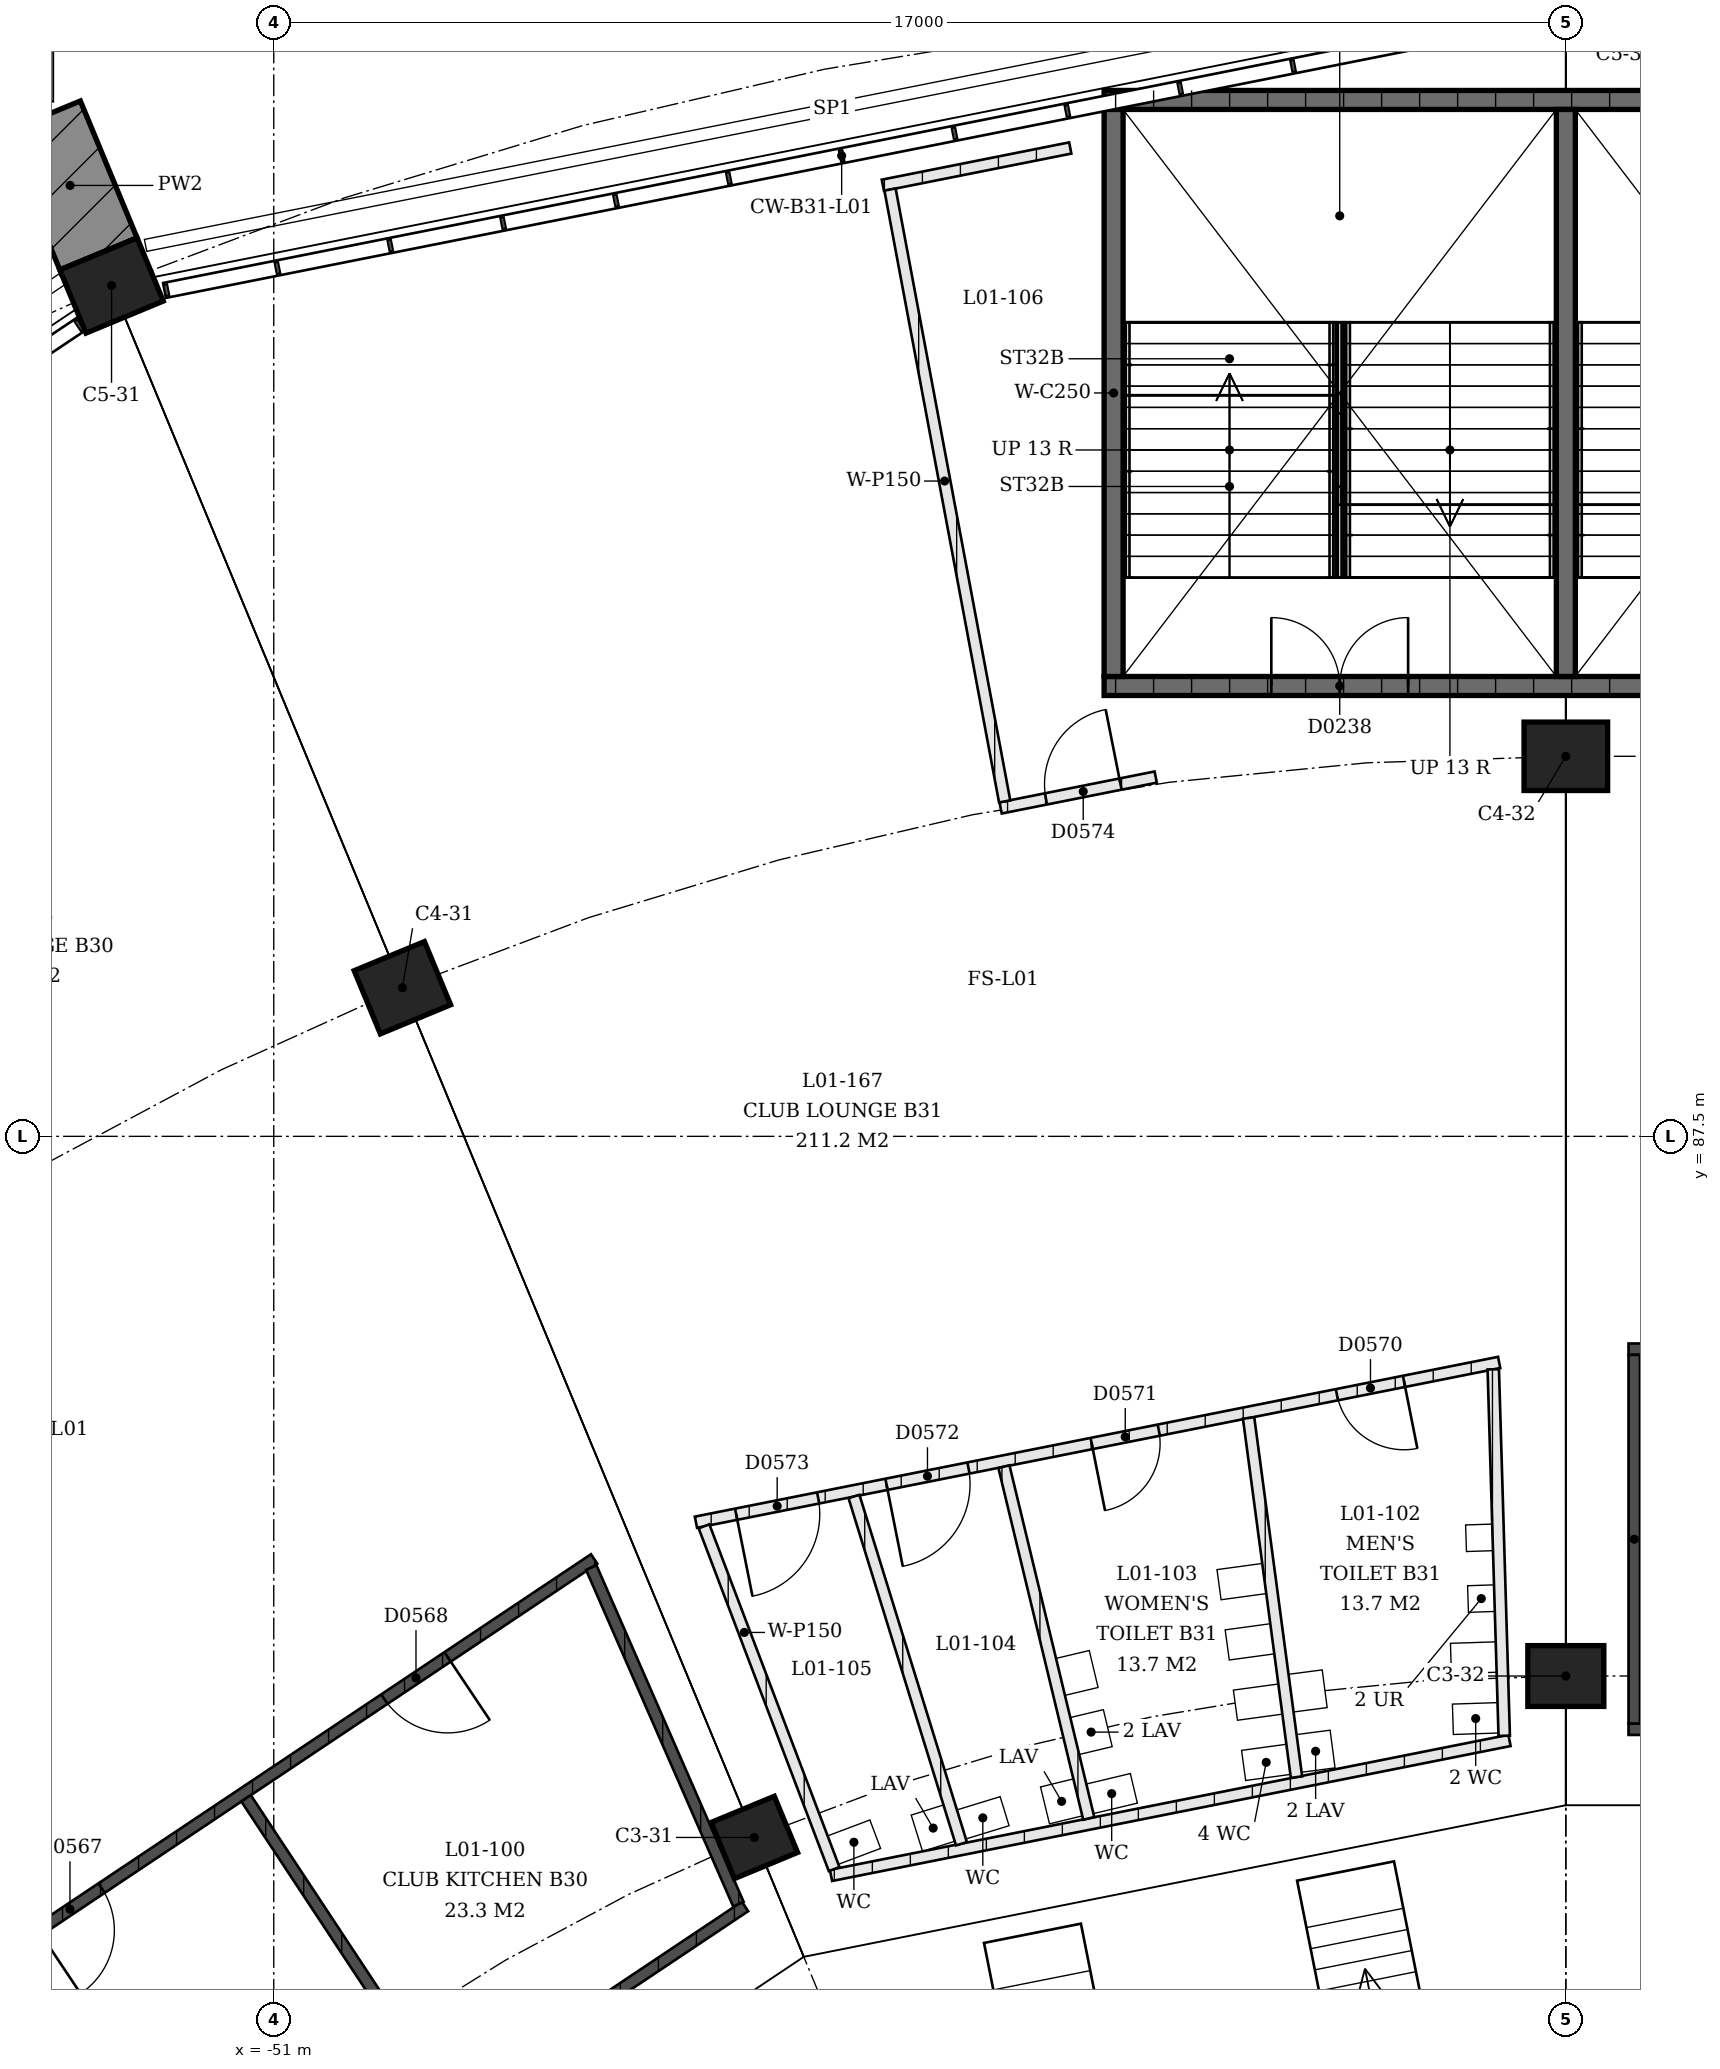
"""IFC4 building model, lengths in metres.
Left out: names, types, materials, properties, quantities, classifications, styles, units other than length and angle.
Written with IfcOpenShell. Run it as: python <this file> out.ifc"""

import sys

from ifc_helpers import new_model, si_unit, direction, frame, frame_2d, origin, origin_2d, place, context, subcontext, project, spatial, rectangle, extrude, element, fill, save


model = new_model("IFC4")
c1 = context("Model", 3, precision=1e-05, world=origin(), true_north=direction((0.0, 1.0)))
c2 = subcontext(c1, "Body", "Model", "MODEL_VIEW")
j1 = project(units=[si_unit("LENGTHUNIT", "METRE"), si_unit("PLANEANGLEUNIT", "RADIAN")], contexts=[c1])
p1 = place(None, origin())
s1 = spatial("IfcSite", under=j1, at=p1, CompositionType="ELEMENT")
p2 = place(p1, origin())
s2 = spatial("IfcBuilding", under=s1, at=p2, CompositionType="ELEMENT")
p3 = place(p2, frame((0.0, 0.0, 4.5)))
s3 = spatial("IfcBuildingStorey", under=s2, at=p3, CompositionType="ELEMENT", Elevation=4.5)
p4 = place(p3, frame((-44.677, 78.276, 0.0), z_axis=(0.0, 0.0, 1.0), x_axis=(-0.923879532511, -0.382683432365, 0.0)))
e1 = element("IfcColumn", 1, at=p4, inside=s3, PredefinedType="COLUMN", context=c2, shape_type="SweptSolid", body=[
    extrude(rectangle(XDim=0.9, YDim=0.8, at=origin_2d()), origin(), (0.0, 0.0, 1.0), 4.5),
])
p5 = place(p3, frame((-49.307, 89.455, 0.0), z_axis=(0.0, 0.0, 1.0), x_axis=(-0.923879532511, -0.382683432365, 0.0)))
e2 = element("IfcColumn", 2, at=p5, inside=s3, PredefinedType="COLUMN", context=c2, shape_type="SweptSolid", body=[
    extrude(rectangle(XDim=1.0, YDim=0.9, at=origin_2d()), origin(), (0.0, 0.0, 1.0), 4.5),
])
p6 = place(p3, frame((-53.134, 98.694, 0.0), z_axis=(0.0, 0.0, 1.0), x_axis=(-0.923879532511, -0.382683432365, 0.0)))
e3 = element("IfcColumn", 3, at=p6, inside=s3, PredefinedType="COLUMN", context=c2, shape_type="SweptSolid", body=[
    extrude(rectangle(XDim=1.1, YDim=0.9, at=origin_2d()), origin(), (0.0, 0.0, 1.0), 4.5),
])
p7 = place(p3, frame((-34.0, 80.4, 0.0), z_axis=(0.0, 0.0, 1.0), x_axis=(-1.0, 0.0, 0.0)))
e4 = element("IfcColumn", 4, at=p7, inside=s3, PredefinedType="COLUMN", context=c2, shape_type="SweptSolid", body=[
    extrude(rectangle(XDim=1.0, YDim=0.8, at=origin_2d()), origin(), (0.0, 0.0, 1.0), 4.5),
])
p8 = place(p3, frame((-34.0, 92.5, 0.0), z_axis=(0.0, 0.0, 1.0), x_axis=(-1.0, 0.0, 0.0)))
e5 = element("IfcColumn", 5, at=p8, inside=s3, PredefinedType="COLUMN", context=c2, shape_type="SweptSolid", body=[
    extrude(rectangle(XDim=1.1, YDim=0.9, at=origin_2d()), origin(), (0.0, 0.0, 1.0), 4.5),
])
p9 = place(p3, frame((-27.925, 93.425, 0.0), z_axis=(0.0, 0.0, 1.0), x_axis=(-1.0, 0.0, 0.0)))
e6 = element("IfcWall", 6, at=p9, inside=s3, PredefinedType="SHEAR", context=c2, shape_type="SweptSolid", body=[
    extrude(rectangle(XDim=12.15, YDim=0.25, at=frame_2d((6.075, 0.0))), origin(), (0.0, 0.0, 1.0), 4.09),
])
p10 = place(p9, frame((2.2, 0.0, 0.0)))
e7 = element("IfcOpeningElement", 7, at=p10, cuts=e6, PredefinedType="OPENING", context=c2, shape_type="SweptSolid", body=[
    extrude(rectangle(XDim=1.8, YDim=2.1, at=frame_2d((0.9, 1.05))), frame((0.0, 0.125, 0.0), z_axis=(0.0, -1.0, 0.0), x_axis=(1.0, 0.0, 0.0)), (0.0, 0.0, 1.0), 0.25),
])
p11 = place(p9, frame((8.15, 0.0, 0.0)))
e8 = element("IfcOpeningElement", 8, at=p11, cuts=e6, PredefinedType="OPENING", context=c2, shape_type="SweptSolid", body=[
    extrude(rectangle(XDim=1.8, YDim=2.1, at=frame_2d((0.9, 1.05))), frame((0.0, 0.125, 0.0), z_axis=(0.0, -1.0, 0.0), x_axis=(1.0, 0.0, 0.0)), (0.0, 0.0, 1.0), 0.25),
])
p12 = place(p3, frame((-27.925, 101.135, 0.0), z_axis=(0.0, 0.0, 1.0), x_axis=(-1.0, 0.0, 0.0)))
e9 = element("IfcWall", 9, at=p12, inside=s3, PredefinedType="SHEAR", context=c2, shape_type="SweptSolid", body=[
    extrude(rectangle(XDim=12.15, YDim=0.25, at=frame_2d((6.075, 0.0))), origin(), (0.0, 0.0, 1.0), 4.09),
])
for number, where, z_axis, x_axis in (
    (10, (-39.95, 93.55, 0.0), (0.0, 0.0, 1.0), (0.0, 1.0, 0.0)),
    (11, (-34.0, 93.55, 0.0), (0.0, 0.0, 1.0), (0.0, 1.0, 0.0)),
):
    element("IfcWall", number, at=place(p3, frame(where, z_axis=z_axis, x_axis=x_axis)), inside=s3, PredefinedType="SHEAR", context=c2, shape_type="SweptSolid", body=[
        extrude(rectangle(XDim=7.46, YDim=0.25, at=frame_2d((3.73, 0.0))), origin(), (0.0, 0.0, 1.0), 4.09),
    ])
p13 = place(p3, frame((-52.605, 72.153, 0.0), z_axis=(0.0, 0.0, 1.0), x_axis=(0.831461674059, 0.555582113257, 0.0)))
e12 = element("IfcWall", 12, at=p13, inside=s3, PredefinedType="SOLIDWALL", context=c2, shape_type="SweptSolid", body=[
    extrude(rectangle(XDim=9.388, YDim=0.15, at=frame_2d((4.694, 0.0))), origin(), (0.0, 0.0, 1.0), 3.0),
])
p14 = place(p3, frame((-56.025, 75.766, 0.0), z_axis=(0.0, 0.0, 1.0), x_axis=(0.831478677095, 0.55555666636, 0.0)))
e13 = element("IfcWall", 13, at=p14, inside=s3, PredefinedType="SOLIDWALL", context=c2, shape_type="SweptSolid", body=[
    extrude(rectangle(XDim=11.113, YDim=0.15, at=frame_2d((5.557, 0.0))), origin(), (0.0, 0.0, 1.0), 3.0),
])
p15 = place(p14, frame((2.319, 0.0, 0.0)))
e14 = element("IfcOpeningElement", 14, at=p15, cuts=e13, PredefinedType="OPENING", context=c2, shape_type="SweptSolid", body=[
    extrude(rectangle(XDim=1.0, YDim=2.1, at=frame_2d((0.5, 1.05))), frame((0.0, 0.075, 0.0), z_axis=(0.0, -1.0, 0.0), x_axis=(1.0, 0.0, 0.0)), (0.0, 0.0, 1.0), 0.15),
])
p16 = place(p14, frame((7.794, 0.0, 0.0)))
e15 = element("IfcOpeningElement", 15, at=p16, cuts=e13, PredefinedType="OPENING", context=c2, shape_type="SweptSolid", body=[
    extrude(rectangle(XDim=1.0, YDim=2.1, at=frame_2d((0.5, 1.05))), frame((0.0, 0.075, 0.0), z_axis=(0.0, -1.0, 0.0), x_axis=(1.0, 0.0, 0.0)), (0.0, 0.0, 1.0), 0.15),
])
p17 = place(p3, frame((-48.743, 74.822, 0.0), z_axis=(0.0, 0.0, 1.0), x_axis=(-0.551118175735, 0.834427202561, 0.0)))
e16 = element("IfcWall", 16, at=p17, inside=s3, PredefinedType="SOLIDWALL", context=c2, shape_type="SweptSolid", body=[
    extrude(rectangle(XDim=4.757, YDim=0.15, at=frame_2d((2.378, 0.0))), origin(), (0.0, 0.0, 1.0), 3.0),
])
p18 = place(p3, frame((-44.886, 77.399, 0.0), z_axis=(0.0, 0.0, 1.0), x_axis=(-0.400646552146, 0.916232688924, 0.0)))
e17 = element("IfcWall", 17, at=p18, inside=s3, PredefinedType="SOLIDWALL", context=c2, shape_type="SweptSolid", body=[
    extrude(rectangle(XDim=4.832, YDim=0.15, at=frame_2d((2.416, 0.0))), origin(), (0.0, 0.0, 1.0), 3.0),
])
p19 = place(p3, frame((-34.741, 79.552, 0.0), z_axis=(0.0, 0.0, 1.0), x_axis=(-0.980786464492, -0.195084369103, 0.0)))
e18 = element("IfcWall", 18, at=p19, inside=s3, PredefinedType="PARTITIONING", context=c2, shape_type="SweptSolid", body=[
    extrude(rectangle(XDim=9.102, YDim=0.15, at=frame_2d((4.551, 0.0))), origin(), (0.0, 0.0, 1.0), 3.0),
])
p20 = place(p3, frame((-34.877, 84.525, 0.0), z_axis=(0.0, 0.0, 1.0), x_axis=(-0.98078580384, -0.195087690502, 0.0)))
e19 = element("IfcWall", 19, at=p20, inside=s3, PredefinedType="PARTITIONING", context=c2, shape_type="SweptSolid", body=[
    extrude(rectangle(XDim=10.775, YDim=0.15, at=frame_2d((5.387, 0.0))), origin(), (0.0, 0.0, 1.0), 3.0),
])
p21 = place(p20, frame((1.276, 0.0, 0.0)))
e20 = element("IfcOpeningElement", 20, at=p21, cuts=e19, PredefinedType="OPENING", context=c2, shape_type="SweptSolid", body=[
    extrude(rectangle(XDim=0.9, YDim=2.1, at=frame_2d((0.45, 1.05))), frame((0.0, 0.075, 0.0), z_axis=(0.0, -1.0, 0.0), x_axis=(1.0, 0.0, 0.0)), (0.0, 0.0, 1.0), 0.15),
])
p22 = place(p20, frame((4.566, 0.0, 0.0)))
e21 = element("IfcOpeningElement", 21, at=p22, cuts=e19, PredefinedType="OPENING", context=c2, shape_type="SweptSolid", body=[
    extrude(rectangle(XDim=0.9, YDim=2.1, at=frame_2d((0.45, 1.05))), frame((0.0, 0.075, 0.0), z_axis=(0.0, -1.0, 0.0), x_axis=(1.0, 0.0, 0.0)), (0.0, 0.0, 1.0), 0.15),
])
p23 = place(p20, frame((7.119, 0.0, 0.0)))
e22 = element("IfcOpeningElement", 22, at=p23, cuts=e19, PredefinedType="OPENING", context=c2, shape_type="SweptSolid", body=[
    extrude(rectangle(XDim=1.1, YDim=2.1, at=frame_2d((0.55, 1.05))), frame((0.0, 0.075, 0.0), z_axis=(0.0, -1.0, 0.0), x_axis=(1.0, 0.0, 0.0)), (0.0, 0.0, 1.0), 0.15),
])
p24 = place(p20, frame((9.135, 0.0, 0.0)))
e23 = element("IfcOpeningElement", 23, at=p24, cuts=e19, PredefinedType="OPENING", context=c2, shape_type="SweptSolid", body=[
    extrude(rectangle(XDim=1.1, YDim=2.1, at=frame_2d((0.55, 1.05))), frame((0.0, 0.075, 0.0), z_axis=(0.0, -1.0, 0.0), x_axis=(1.0, 0.0, 0.0)), (0.0, 0.0, 1.0), 0.15),
])
p25 = place(p3, frame((-34.811, 79.614, 0.0), z_axis=(0.0, 0.0, 1.0), x_axis=(-0.02991368842, 0.999552485488, 0.0)))
e24 = element("IfcWall", 24, at=p25, inside=s3, PredefinedType="PARTITIONING", context=c2, shape_type="SweptSolid", body=[
    extrude(rectangle(XDim=4.823, YDim=0.15, at=frame_2d((2.412, 0.0))), origin(), (0.0, 0.0, 1.0), 3.0),
])
p26 = place(p3, frame((-37.544, 79.07, 0.0), z_axis=(0.0, 0.0, 1.0), x_axis=(-0.132200625744, 0.99122297923, 0.0)))
e25 = element("IfcWall", 25, at=p26, inside=s3, PredefinedType="PARTITIONING", context=c2, shape_type="SweptSolid", body=[
    extrude(rectangle(XDim=4.766, YDim=0.15, at=frame_2d((2.383, 0.0))), origin(), (0.0, 0.0, 1.0), 3.0),
])
p27 = place(p3, frame((-40.277, 78.526, 0.0), z_axis=(0.0, 0.0, 1.0), x_axis=(-0.234455054274, 0.9721269606, 0.0)))
e26 = element("IfcWall", 26, at=p27, inside=s3, PredefinedType="PARTITIONING", context=c2, shape_type="SweptSolid", body=[
    extrude(rectangle(XDim=4.761, YDim=0.15, at=frame_2d((2.38, 0.0))), origin(), (0.0, 0.0, 1.0), 3.0),
])
p28 = place(p3, frame((-41.952, 78.193, 0.0), z_axis=(0.0, 0.0, 1.0), x_axis=(-0.295678182088, 0.955287607288, 0.0)))
e27 = element("IfcWall", 27, at=p28, inside=s3, PredefinedType="PARTITIONING", context=c2, shape_type="SweptSolid", body=[
    extrude(rectangle(XDim=4.782, YDim=0.15, at=frame_2d((2.391, 0.0))), origin(), (0.0, 0.0, 1.0), 3.0),
])
p29 = place(p3, frame((-43.627, 77.86, 0.0), z_axis=(0.0, 0.0, 1.0), x_axis=(-0.354909029819, 0.934900839957, 0.0)))
e28 = element("IfcWall", 28, at=p29, inside=s3, PredefinedType="PARTITIONING", context=c2, shape_type="SweptSolid", body=[
    extrude(rectangle(XDim=4.823, YDim=0.15, at=frame_2d((2.412, 0.0))), origin(), (0.0, 0.0, 1.0), 3.0),
])
p30 = place(p3, frame((-39.396, 92.227, 0.0), z_axis=(0.0, 0.0, 1.0), x_axis=(-0.980792255889, -0.195055250603, 0.0)))
e29 = element("IfcWall", 29, at=p30, inside=s3, PredefinedType="PARTITIONING", context=c2, shape_type="SweptSolid", body=[
    extrude(rectangle(XDim=2.08, YDim=0.15, at=frame_2d((1.04, 0.0))), origin(), (0.0, 0.0, 1.0), 3.0),
])
p31 = place(p30, frame((0.472, 0.0, 0.0)))
e30 = element("IfcOpeningElement", 30, at=p31, cuts=e29, PredefinedType="OPENING", context=c2, shape_type="SweptSolid", body=[
    extrude(rectangle(XDim=1.0, YDim=2.1, at=frame_2d((0.5, 1.05))), frame((0.0, 0.075, 0.0), z_axis=(0.0, -1.0, 0.0), x_axis=(1.0, 0.0, 0.0)), (0.0, 0.0, 1.0), 0.15),
])
p32 = place(p3, frame((-40.52, 100.503, 0.0), z_axis=(0.0, 0.0, 1.0), x_axis=(-0.980796747004, -0.195032666665, 0.0)))
e31 = element("IfcWall", 31, at=p32, inside=s3, PredefinedType="PARTITIONING", context=c2, shape_type="SweptSolid", body=[
    extrude(rectangle(XDim=2.514, YDim=0.15, at=frame_2d((1.257, 0.0))), origin(), (0.0, 0.0, 1.0), 3.0),
])
p33 = place(p3, frame((-41.383, 91.906, 0.0), z_axis=(0.0, 0.0, 1.0), x_axis=(-0.184160747979, 0.982896138411, 0.0)))
e32 = element("IfcWall", 32, at=p33, inside=s3, PredefinedType="PARTITIONING", context=c2, shape_type="SweptSolid", body=[
    extrude(rectangle(XDim=8.19, YDim=0.15, at=frame_2d((4.095, 0.0))), origin(), (0.0, 0.0, 1.0), 3.0),
])
p34 = place(p3, frame((-33.175, 79.7, 0.0), z_axis=(0.0, 0.0, 1.0), x_axis=(1.0, 0.0, 0.0)))
e33 = element("IfcWall", 33, at=p34, inside=s3, PredefinedType="SOLIDWALL", context=c2, shape_type="SweptSolid", body=[
    extrude(rectangle(XDim=11.95, YDim=0.15, at=frame_2d((5.975, 0.0))), origin(), (0.0, 0.0, 1.0), 3.0),
])
p35 = place(p3, frame((-33.175, 84.7, 0.0), z_axis=(0.0, 0.0, 1.0), x_axis=(1.0, 0.0, 0.0)))
e34 = element("IfcWall", 34, at=p35, inside=s3, PredefinedType="SOLIDWALL", context=c2, shape_type="SweptSolid", body=[
    extrude(rectangle(XDim=11.95, YDim=0.15, at=frame_2d((5.975, 0.0))), origin(), (0.0, 0.0, 1.0), 3.0),
])
p36 = place(p35, frame((2.525, 0.0, 0.0)))
e35 = element("IfcOpeningElement", 35, at=p36, cuts=e34, PredefinedType="OPENING", context=c2, shape_type="SweptSolid", body=[
    extrude(rectangle(XDim=1.0, YDim=2.1, at=frame_2d((0.5, 1.05))), frame((0.0, 0.075, 0.0), z_axis=(0.0, -1.0, 0.0), x_axis=(1.0, 0.0, 0.0)), (0.0, 0.0, 1.0), 0.15),
])
p37 = place(p35, frame((8.425, 0.0, 0.0)))
e36 = element("IfcOpeningElement", 36, at=p37, cuts=e34, PredefinedType="OPENING", context=c2, shape_type="SweptSolid", body=[
    extrude(rectangle(XDim=1.0, YDim=2.1, at=frame_2d((0.5, 1.05))), frame((0.0, 0.075, 0.0), z_axis=(0.0, -1.0, 0.0), x_axis=(1.0, 0.0, 0.0)), (0.0, 0.0, 1.0), 0.15),
])
p38 = place(p3, frame((-33.1, 79.775, 0.0), z_axis=(0.0, 0.0, 1.0), x_axis=(0.0, 1.0, 0.0)))
e37 = element("IfcWall", 37, at=p38, inside=s3, PredefinedType="SOLIDWALL", context=c2, shape_type="SweptSolid", body=[
    extrude(rectangle(XDim=4.85, YDim=0.15, at=frame_2d((2.425, 0.0))), origin(), (0.0, 0.0, 1.0), 3.0),
])
p39 = place(p11, origin())
e38 = element("IfcDoor", 38, at=p39, inside=s3, OperationType="DOUBLE_DOOR_SINGLE_SWING", PredefinedType="DOOR", context=c2, shape_type="SweptSolid", body=[
    extrude(rectangle(XDim=1.8, YDim=2.1, at=frame_2d((0.9, 1.05))), frame((0.0, 0.025, 0.0), z_axis=(0.0, -1.0, 0.0), x_axis=(1.0, 0.0, 0.0)), (0.0, 0.0, 1.0), 0.05),
])
fill(e8, e38)
p40 = place(p15, origin())
e39 = element("IfcDoor", 39, at=p40, inside=s3, OperationType="SINGLE_SWING_LEFT", PredefinedType="DOOR", context=c2, shape_type="SweptSolid", body=[
    extrude(rectangle(XDim=1.0, YDim=2.1, at=frame_2d((0.5, 1.05))), frame((0.0, 0.025, 0.0), z_axis=(0.0, -1.0, 0.0), x_axis=(1.0, 0.0, 0.0)), (0.0, 0.0, 1.0), 0.05),
])
fill(e14, e39)
p41 = place(p16, origin())
e40 = element("IfcDoor", 40, at=p41, inside=s3, OperationType="SINGLE_SWING_RIGHT", PredefinedType="DOOR", context=c2, shape_type="SweptSolid", body=[
    extrude(rectangle(XDim=1.0, YDim=2.1, at=frame_2d((0.5, 1.05))), frame((0.0, 0.025, 0.0), z_axis=(0.0, -1.0, 0.0), x_axis=(1.0, 0.0, 0.0)), (0.0, 0.0, 1.0), 0.05),
])
fill(e15, e40)
p42 = place(p21, origin())
e41 = element("IfcDoor", 41, at=p42, inside=s3, OperationType="SINGLE_SWING_RIGHT", PredefinedType="DOOR", context=c2, shape_type="SweptSolid", body=[
    extrude(rectangle(XDim=0.9, YDim=2.1, at=frame_2d((0.45, 1.05))), frame((0.0, 0.025, 0.0), z_axis=(0.0, -1.0, 0.0), x_axis=(1.0, 0.0, 0.0)), (0.0, 0.0, 1.0), 0.05),
])
fill(e20, e41)
p43 = place(p22, origin())
e42 = element("IfcDoor", 42, at=p43, inside=s3, OperationType="SINGLE_SWING_LEFT", PredefinedType="DOOR", context=c2, shape_type="SweptSolid", body=[
    extrude(rectangle(XDim=0.9, YDim=2.1, at=frame_2d((0.45, 1.05))), frame((0.0, 0.025, 0.0), z_axis=(0.0, -1.0, 0.0), x_axis=(1.0, 0.0, 0.0)), (0.0, 0.0, 1.0), 0.05),
])
fill(e21, e42)
p44 = place(p23, origin())
e43 = element("IfcDoor", 43, at=p44, inside=s3, OperationType="SINGLE_SWING_LEFT", PredefinedType="DOOR", context=c2, shape_type="SweptSolid", body=[
    extrude(rectangle(XDim=1.1, YDim=2.1, at=frame_2d((0.55, 1.05))), frame((0.0, 0.025, 0.0), z_axis=(0.0, -1.0, 0.0), x_axis=(1.0, 0.0, 0.0)), (0.0, 0.0, 1.0), 0.05),
])
fill(e22, e43)
p45 = place(p24, origin())
e44 = element("IfcDoor", 44, at=p45, inside=s3, OperationType="SINGLE_SWING_LEFT", PredefinedType="DOOR", context=c2, shape_type="SweptSolid", body=[
    extrude(rectangle(XDim=1.1, YDim=2.1, at=frame_2d((0.55, 1.05))), frame((0.0, 0.025, 0.0), z_axis=(0.0, -1.0, 0.0), x_axis=(1.0, 0.0, 0.0)), (0.0, 0.0, 1.0), 0.05),
])
fill(e23, e44)
p46 = place(p31, origin())
e45 = element("IfcDoor", 45, at=p46, inside=s3, OperationType="SINGLE_SWING_LEFT", PredefinedType="DOOR", context=c2, shape_type="SweptSolid", body=[
    extrude(rectangle(XDim=1.0, YDim=2.1, at=frame_2d((0.5, 1.05))), frame((0.0, 0.025, 0.0), z_axis=(0.0, -1.0, 0.0), x_axis=(1.0, 0.0, 0.0)), (0.0, 0.0, 1.0), 0.05),
])
fill(e30, e45)
save(model, sys.argv[1])
